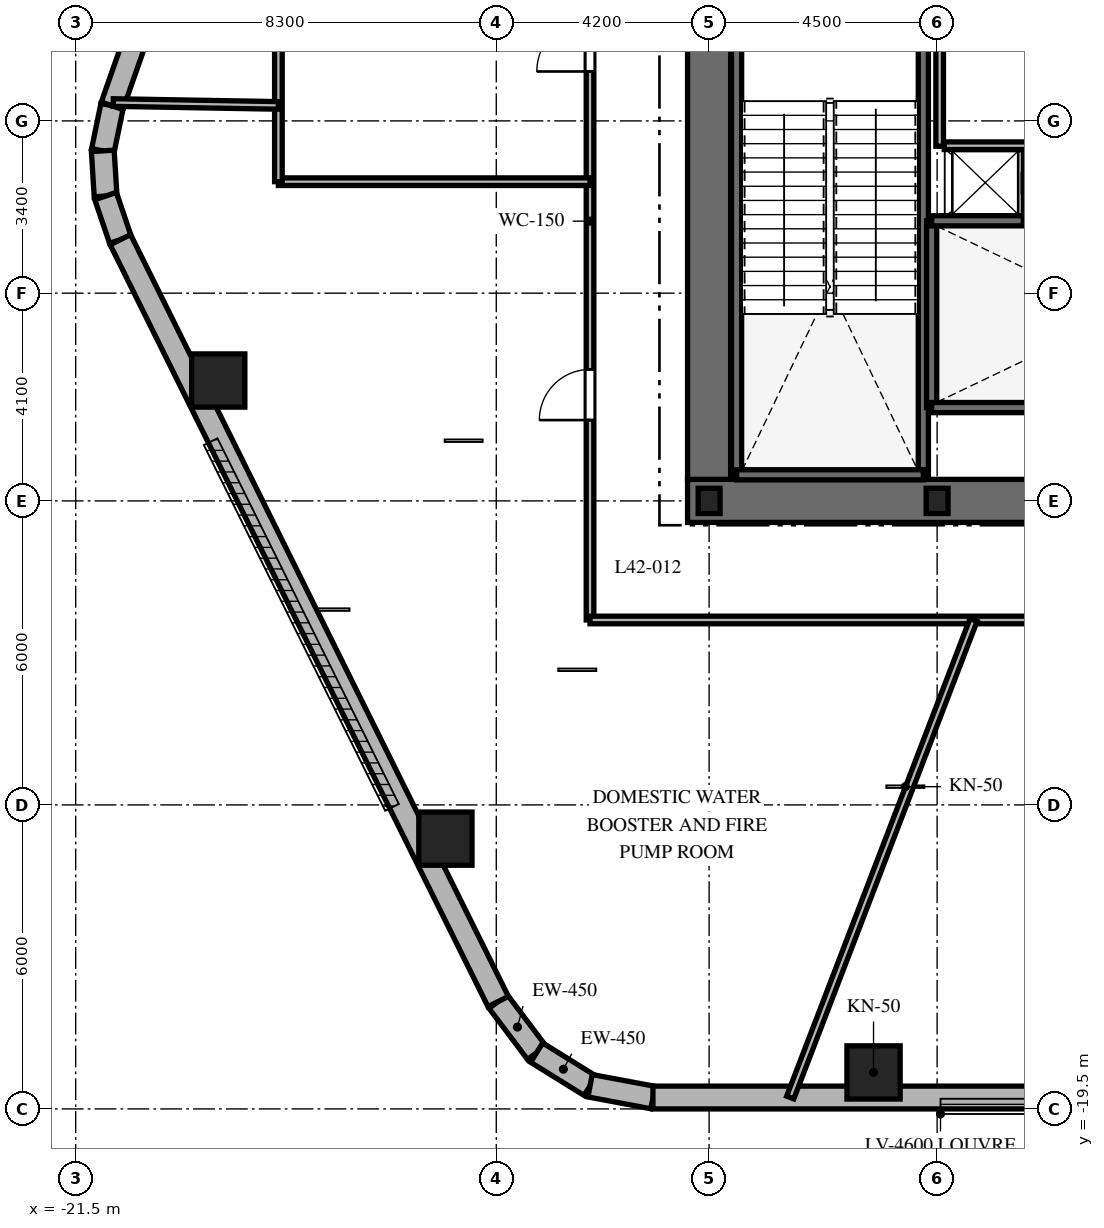
"""IFC4 building model, lengths in metres.
Left out: names, types, materials, properties, quantities, classifications, styles, units other than length and angle.
Written with IfcOpenShell. Run it as: python <this file> out.ifc"""

import sys

from ifc_helpers import new_model, si_unit, direction, frame, frame_2d, origin, origin_2d, place, context, subcontext, project, spatial, rectangle, i_section, extrude, element, fill, save


model = new_model("IFC4")
c1 = context("Model", 3, precision=1e-05, world=origin(), true_north=direction((0.0, 1.0)))
c2 = subcontext(c1, "Body", "Model", "MODEL_VIEW")
j1 = project(units=[si_unit("LENGTHUNIT", "METRE"), si_unit("PLANEANGLEUNIT", "RADIAN")], contexts=[c1])
p1 = place(None, origin())
s1 = spatial("IfcSite", under=j1, at=p1, CompositionType="ELEMENT")
p2 = place(p1, origin())
s2 = spatial("IfcBuilding", under=s1, at=p2, CompositionType="ELEMENT")
p3 = place(p2, frame((0.0, 0.0, 170.2)))
s3 = spatial("IfcBuildingStorey", under=s2, at=p3, CompositionType="ELEMENT", Elevation=170.2)
p4 = place(p3, frame((-9.425, -7.5, 0.0), z_axis=(0.0, 0.0, 1.0), x_axis=(1.0, 0.0, 0.0)))
e1 = element("IfcWall", 1, at=p4, inside=s3, PredefinedType="SHEAR", context=c2, shape_type="SweptSolid", body=[
    extrude(rectangle(XDim=18.85, YDim=0.85, at=frame_2d((9.425, 0.0))), origin(), (0.0, 0.0, 1.0), 5.4),
])
p5 = place(p4, frame((9.475, 0.0, 0.0)))
e2 = element("IfcOpeningElement", 2, at=p5, cuts=e1, PredefinedType="OPENING", context=c2, shape_type="SweptSolid", body=[
    extrude(rectangle(XDim=1.0, YDim=2.15, at=frame_2d((0.5, 1.075))), frame((0.0, 0.435, 0.0), z_axis=(0.0, -1.0, 0.0), x_axis=(1.0, 0.0, 0.0)), (0.0, 0.0, 1.0), 0.87),
])
p6 = place(p3, frame((-9.0, -7.075, 0.0), z_axis=(0.0, 0.0, 1.0), x_axis=(0.0, 1.0, 0.0)))
e3 = element("IfcWall", 3, at=p6, inside=s3, PredefinedType="SHEAR", context=c2, shape_type="SweptSolid", body=[
    extrude(rectangle(XDim=14.15, YDim=0.85, at=frame_2d((7.075, 0.0))), origin(), (0.0, 0.0, 1.0), 5.4),
])
p7 = place(p6, frame((10.2, 0.0, 0.0)))
e4 = element("IfcOpeningElement", 4, at=p7, cuts=e3, PredefinedType="OPENING", context=c2, shape_type="SweptSolid", body=[
    extrude(rectangle(XDim=1.05, YDim=2.15, at=frame_2d((0.525, 1.075))), frame((0.0, 0.435, 0.0), z_axis=(0.0, -1.0, 0.0), x_axis=(1.0, 0.0, 0.0)), (0.0, 0.0, 1.0), 0.87),
])
for number, where, z_axis, x_axis in (
    (5, (-8.458, -6.985, 0.0), (0.0, 0.0, 1.0), (0.0, 1.0, 0.0)),
    (6, (-4.772, -6.985, 0.0), (0.0, 0.0, 1.0), (0.0, 1.0, 0.0)),
):
    element("IfcWall", number, at=place(p3, frame(where, z_axis=z_axis, x_axis=x_axis)), inside=s3, PredefinedType="SHEAR", context=c2, shape_type="SweptSolid", body=[
        extrude(rectangle(XDim=9.143, YDim=0.2, at=frame_2d((4.572, 0.0))), origin(), (0.0, 0.0, 1.0), 5.4),
    ])
for number, where, z_axis, x_axis in (
    (7, (-8.458, -6.985, 0.0), (0.0, 0.0, 1.0), (1.0, 0.0, 0.0)),
    (8, (-4.608, -5.658, 0.0), (0.0, 0.0, 1.0), (0.0, 1.0, 0.0)),
):
    element("IfcWall", number, at=place(p3, frame(where, z_axis=z_axis, x_axis=x_axis)), inside=s3, PredefinedType="SHEAR", context=c2, shape_type="SweptSolid", body=[
        extrude(rectangle(XDim=3.686, YDim=0.2, at=frame_2d((1.843, 0.0))), origin(), (0.0, 0.0, 1.0), 5.4),
    ])
p8 = place(p3, frame((-4.608, -5.658, 0.0), z_axis=(0.0, 0.0, 1.0), x_axis=(1.0, 0.0, 0.0)))
e9 = element("IfcWall", 9, at=p8, inside=s3, PredefinedType="SHEAR", context=c2, shape_type="SweptSolid", body=[
    extrude(rectangle(XDim=9.166, YDim=0.2, at=frame_2d((4.583, 0.0))), origin(), (0.0, 0.0, 1.0), 5.4),
])
p9 = place(p8, frame((7.45, 0.0, 0.0)))
e10 = element("IfcOpeningElement", 10, at=p9, cuts=e9, PredefinedType="OPENING", context=c2, shape_type="SweptSolid", body=[
    extrude(rectangle(XDim=1.0, YDim=2.15, at=frame_2d((0.5, 1.075))), frame((0.0, 0.11, 0.0), z_axis=(0.0, -1.0, 0.0), x_axis=(1.0, 0.0, 0.0)), (0.0, 0.0, 1.0), 0.22),
])
p10 = place(p3, frame((-4.608, -1.972, 0.0), z_axis=(0.0, 0.0, 1.0), x_axis=(1.0, 0.0, 0.0)))
e11 = element("IfcWall", 11, at=p10, inside=s3, PredefinedType="SHEAR", context=c2, shape_type="SweptSolid", body=[
    extrude(rectangle(XDim=9.166, YDim=0.2, at=frame_2d((4.583, 0.0))), origin(), (0.0, 0.0, 1.0), 5.4),
])
for number, where, z_axis, x_axis in (
    (12, (-9.0, -7.5, 0.0), (0.0, 0.0, 1.0), (1.0, 0.0, 0.0)),
    (13, (-4.5, -7.5, 0.0), (0.0, 0.0, 1.0), (1.0, 0.0, 0.0)),
):
    element("IfcColumn", number, at=place(p3, frame(where, z_axis=z_axis, x_axis=x_axis)), inside=s3, PredefinedType="COLUMN", context=c2, shape_type="SweptSolid", body=[
        extrude(i_section(OverallWidth=0.432, OverallDepth=0.498, WebThickness=0.056, FlangeThickness=0.089, at=origin_2d()), origin(), (0.0, 0.0, 1.0), 5.4),
    ])
for number, where, z_axis, x_axis in (
    (14, (-5.755, -18.78, 0.0), (0.0, 0.0, 1.0), (1.0, 0.0, 0.0)),
    (15, (-18.687, -5.124, 0.0), (0.0, 0.0, 1.0), (1.0, 0.0, 0.0)),
    (16, (-14.204, -14.166, 0.0), (0.0, 0.0, 1.0), (1.0, 0.0, 0.0)),
):
    element("IfcColumn", number, at=place(p3, frame(where, z_axis=z_axis, x_axis=x_axis)), inside=s3, PredefinedType="COLUMN", context=c2, shape_type="SweptSolid", body=[
        extrude(rectangle(XDim=1.05, YDim=1.05, at=origin_2d()), origin(), (0.0, 0.0, 1.0), 5.4),
    ])
p11 = place(p3, frame((-13.162, -17.381, 0.0), z_axis=(0.0, 0.0, 1.0), x_axis=(0.601515770517, -0.798860925205, 0.0)))
e17 = element("IfcWall", 17, at=p11, inside=s3, PredefinedType="SOLIDWALL", context=c2, shape_type="SweptSolid", body=[
    extrude(rectangle(XDim=1.262, YDim=0.45, at=frame_2d((0.631, 0.0))), origin(), (0.0, 0.0, 1.0), 5.1),
])
p12 = place(p3, frame((-12.403, -18.389, 0.0), z_axis=(0.0, 0.0, 1.0), x_axis=(0.849795170926, -0.527113049991, 0.0)))
e18 = element("IfcWall", 18, at=p12, inside=s3, PredefinedType="SOLIDWALL", context=c2, shape_type="SweptSolid", body=[
    extrude(rectangle(XDim=1.241, YDim=0.45, at=frame_2d((0.62, 0.0))), origin(), (0.0, 0.0, 1.0), 5.1),
])
p13 = place(p3, frame((-11.349, -19.043, 0.0), z_axis=(0.0, 0.0, 1.0), x_axis=(0.982931267051, -0.183973161772, 0.0)))
e19 = element("IfcWall", 19, at=p13, inside=s3, PredefinedType="SOLIDWALL", context=c2, shape_type="SweptSolid", body=[
    extrude(rectangle(XDim=1.262, YDim=0.45, at=frame_2d((0.631, 0.0))), origin(), (0.0, 0.0, 1.0), 5.1),
])
p14 = place(p3, frame((-20.782, 0.298, 0.0), z_axis=(0.0, 0.0, 1.0), x_axis=(-0.202570068411, -0.979267771033, 0.0)))
e20 = element("IfcWall", 20, at=p14, inside=s3, PredefinedType="SOLIDWALL", context=c2, shape_type="SweptSolid", body=[
    extrude(rectangle(XDim=0.909, YDim=0.45, at=frame_2d((0.454, 0.0))), origin(), (0.0, 0.0, 1.0), 5.1),
])
p15 = place(p3, frame((-20.966, -0.592, 0.0), z_axis=(0.0, 0.0, 1.0), x_axis=(0.061748898935, -0.998091715966, 0.0)))
e21 = element("IfcWall", 21, at=p15, inside=s3, PredefinedType="SOLIDWALL", context=c2, shape_type="SweptSolid", body=[
    extrude(rectangle(XDim=0.894, YDim=0.45, at=frame_2d((0.447, 0.0))), origin(), (0.0, 0.0, 1.0), 5.1),
])
p16 = place(p3, frame((-20.911, -1.484, 0.0), z_axis=(0.0, 0.0, 1.0), x_axis=(0.321623334353, -0.946867694453, 0.0)))
e22 = element("IfcWall", 22, at=p16, inside=s3, PredefinedType="SOLIDWALL", context=c2, shape_type="SweptSolid", body=[
    extrude(rectangle(XDim=0.909, YDim=0.45, at=frame_2d((0.454, 0.0))), origin(), (0.0, 0.0, 1.0), 5.1),
])
p17 = place(p3, frame((-10.108, -19.275, 0.0), z_axis=(0.0, 0.0, 1.0), x_axis=(1.0, 0.0, 0.0)))
e23 = element("IfcWall", 23, at=p17, inside=s3, PredefinedType="SOLIDWALL", context=c2, shape_type="SweptSolid", body=[
    extrude(rectangle(XDim=21.829, YDim=0.45, at=frame_2d((10.915, 0.0))), origin(), (0.0, 0.0, 1.0), 5.1),
])
p18 = place(p3, frame((-14.937, 16.993, 0.0), z_axis=(0.0, 0.0, 1.0), x_axis=(-0.330431575061, -0.943829949834, 0.0)))
e24 = element("IfcWall", 24, at=p18, inside=s3, PredefinedType="SOLIDWALL", context=c2, shape_type="SweptSolid", body=[
    extrude(rectangle(XDim=17.689, YDim=0.45, at=frame_2d((8.844, 0.0))), origin(), (0.0, 0.0, 1.0), 5.1),
])
p19 = place(p3, frame((-20.618, -2.344, 0.0), z_axis=(0.0, 0.0, 1.0), x_axis=(0.444243691097, -0.895905990002, 0.0)))
e25 = element("IfcWall", 25, at=p19, inside=s3, PredefinedType="SOLIDWALL", context=c2, shape_type="SweptSolid", body=[
    extrude(rectangle(XDim=16.784, YDim=0.45, at=frame_2d((8.392, 0.0))), origin(), (0.0, 0.0, 1.0), 5.1),
])
p20 = place(p3, frame((-2.7, -1.972, 0.0), z_axis=(0.0, 0.0, 1.0), x_axis=(0.0, 1.0, 0.0)))
e26 = element("IfcWall", 26, at=p20, inside=s3, PredefinedType="PARTITIONING", context=c2, shape_type="SweptSolid", body=[
    extrude(rectangle(XDim=1.472, YDim=0.2, at=frame_2d((0.736, 0.0))), origin(), (0.0, 0.0, 1.0), 5.1),
])
p21 = place(p20, frame((0.24, 0.0, 0.0)))
e27 = element("IfcOpeningElement", 27, at=p21, cuts=e26, PredefinedType="OPENING", context=c2, shape_type="SweptSolid", body=[
    extrude(rectangle(XDim=1.0, YDim=2.2, at=frame_2d((0.5, 1.1))), frame((0.0, 0.11, 0.0), z_axis=(0.0, -1.0, 0.0), x_axis=(1.0, 0.0, 0.0)), (0.0, 0.0, 1.0), 0.22),
])
p22 = place(p3, frame((-4.45, -0.5, 0.0), z_axis=(0.0, 0.0, 1.0), x_axis=(0.0, 1.0, 0.0)))
e28 = element("IfcWall", 28, at=p22, inside=s3, PredefinedType="PARTITIONING", context=c2, shape_type="SweptSolid", body=[
    extrude(rectangle(XDim=2.75, YDim=0.15, at=frame_2d((1.375, 0.0))), origin(), (0.0, 0.0, 1.0), 5.1),
])
p23 = place(p3, frame((-4.36, -0.49, 0.0), z_axis=(0.0, 0.0, 1.0), x_axis=(1.0, 0.0, 0.0)))
e29 = element("IfcWall", 29, at=p23, inside=s3, PredefinedType="PARTITIONING", context=c2, shape_type="SweptSolid", body=[
    extrude(rectangle(XDim=8.72, YDim=0.15, at=frame_2d((4.36, 0.0))), origin(), (0.0, 0.0, 1.0), 5.1),
])
p24 = place(p23, frame((3.86, 0.0, 0.0)))
e30 = element("IfcOpeningElement", 30, at=p24, cuts=e29, PredefinedType="OPENING", context=c2, shape_type="SweptSolid", body=[
    extrude(rectangle(XDim=0.9, YDim=2.03, at=frame_2d((0.45, 1.015))), frame((0.0, 0.085, 0.0), z_axis=(0.0, -1.0, 0.0), x_axis=(1.0, 0.0, 0.0)), (0.0, 0.0, 1.0), 0.17),
])
p25 = place(p3, frame((-11.35, -9.85, 0.0), z_axis=(0.0, 0.0, 1.0), x_axis=(0.0, 1.0, 0.0)))
e31 = element("IfcWall", 31, at=p25, inside=s3, PredefinedType="PARTITIONING", context=c2, shape_type="SweptSolid", body=[
    extrude(rectangle(XDim=19.7, YDim=0.15, at=frame_2d((9.85, 0.0))), origin(), (0.0, 0.0, 1.0), 4.316),
])
p26 = place(p25, frame((10.825, 0.0, 0.0)))
e32 = element("IfcOpeningElement", 32, at=p26, cuts=e31, PredefinedType="OPENING", context=c2, shape_type="SweptSolid", body=[
    extrude(rectangle(XDim=1.05, YDim=2.15, at=frame_2d((0.525, 1.075))), frame((0.0, 0.085, 0.0), z_axis=(0.0, -1.0, 0.0), x_axis=(1.0, 0.0, 0.0)), (0.0, 0.0, 1.0), 0.17),
])
p27 = place(p25, frame((16.255, 0.0, 0.0)))
e33 = element("IfcOpeningElement", 33, at=p27, cuts=e31, PredefinedType="OPENING", context=c2, shape_type="SweptSolid", body=[
    extrude(rectangle(XDim=1.0, YDim=2.15, at=frame_2d((0.5, 1.075))), frame((0.0, 0.085, 0.0), z_axis=(0.0, -1.0, 0.0), x_axis=(1.0, 0.0, 0.0)), (0.0, 0.0, 1.0), 0.17),
])
p28 = place(p25, frame((3.945, 0.0, 0.0)))
e34 = element("IfcOpeningElement", 34, at=p28, cuts=e31, PredefinedType="OPENING", context=c2, shape_type="SweptSolid", body=[
    extrude(rectangle(XDim=1.0, YDim=2.15, at=frame_2d((0.5, 1.075))), frame((0.0, 0.085, 0.0), z_axis=(0.0, -1.0, 0.0), x_axis=(1.0, 0.0, 0.0)), (0.0, 0.0, 1.0), 0.17),
])
p29 = place(p3, frame((11.35, -9.85, 0.0), z_axis=(0.0, 0.0, 1.0), x_axis=(-1.0, 0.0, 0.0)))
e35 = element("IfcWall", 35, at=p29, inside=s3, PredefinedType="PARTITIONING", context=c2, shape_type="SweptSolid", body=[
    extrude(rectangle(XDim=22.7, YDim=0.15, at=frame_2d((11.35, 0.0))), origin(), (0.0, 0.0, 1.0), 4.316),
])
p30 = place(p29, frame((7.194, 0.0, 0.0)))
e36 = element("IfcOpeningElement", 36, at=p30, cuts=e35, PredefinedType="OPENING", context=c2, shape_type="SweptSolid", body=[
    extrude(rectangle(XDim=1.0, YDim=2.15, at=frame_2d((0.5, 1.075))), frame((0.0, 0.085, 0.0), z_axis=(0.0, -1.0, 0.0), x_axis=(1.0, 0.0, 0.0)), (0.0, 0.0, 1.0), 0.17),
])
p31 = place(p3, frame((-17.5, -1.2, 0.0), z_axis=(0.0, 0.0, 1.0), x_axis=(1.0, 0.0, 0.0)))
e37 = element("IfcWall", 37, at=p31, inside=s3, PredefinedType="PARTITIONING", context=c2, shape_type="SweptSolid", body=[
    extrude(rectangle(XDim=6.15, YDim=0.15, at=frame_2d((3.075, 0.0))), origin(), (0.0, 0.0, 1.0), 4.541),
])
p32 = place(p3, frame((-17.5, -1.2, 0.0), z_axis=(0.0, 0.0, 1.0), x_axis=(0.0, 1.0, 0.0)))
e38 = element("IfcWall", 38, at=p32, inside=s3, PredefinedType="PARTITIONING", context=c2, shape_type="SweptSolid", body=[
    extrude(rectangle(XDim=5.4, YDim=0.15, at=frame_2d((2.7, 0.0))), origin(), (0.0, 0.0, 1.0), 4.316),
])
p33 = place(p3, frame((-17.5, 0.305, 0.0), z_axis=(0.0, 0.0, 1.0), x_axis=(-0.99984772798, 0.017450525889, 0.0)))
e39 = element("IfcWall", 39, at=p33, inside=s3, PredefinedType="PARTITIONING", context=c2, shape_type="SweptSolid", body=[
    extrude(rectangle(XDim=3.26, YDim=0.15, at=frame_2d((1.63, 0.0))), origin(), (0.0, 0.0, 1.0), 4.34),
])
p34 = place(p3, frame((-3.781, -9.85, 0.0), z_axis=(0.0, 0.0, 1.0), x_axis=(-0.358374542439, -0.933577895696, 0.0)))
e40 = element("IfcWall", 40, at=p34, inside=s3, PredefinedType="PARTITIONING", context=c2, shape_type="SweptSolid", body=[
    extrude(rectangle(XDim=10.095, YDim=0.15, at=frame_2d((5.048, 0.0))), origin(), (0.0, 0.0, 1.0), 4.316),
])
p35 = place(p26, origin())
e41 = element("IfcDoor", 41, at=p35, inside=s3, OperationType="SINGLE_SWING_LEFT", PredefinedType="DOOR", context=c2, shape_type="SweptSolid", body=[
    extrude(rectangle(XDim=1.05, YDim=2.15, at=frame_2d((0.525, 1.075))), frame((0.0, 0.025, 0.0), z_axis=(0.0, -1.0, 0.0), x_axis=(1.0, 0.0, 0.0)), (0.0, 0.0, 1.0), 0.05),
])
fill(e32, e41)
p36 = place(p28, origin())
e42 = element("IfcDoor", 42, at=p36, inside=s3, OperationType="SINGLE_SWING_LEFT", PredefinedType="DOOR", context=c2, shape_type="SweptSolid", body=[
    extrude(rectangle(XDim=1.0, YDim=2.15, at=frame_2d((0.5, 1.075))), frame((0.0, 0.025, 0.0), z_axis=(0.0, -1.0, 0.0), x_axis=(1.0, 0.0, 0.0)), (0.0, 0.0, 1.0), 0.05),
])
fill(e34, e42)
save(model, sys.argv[1])
